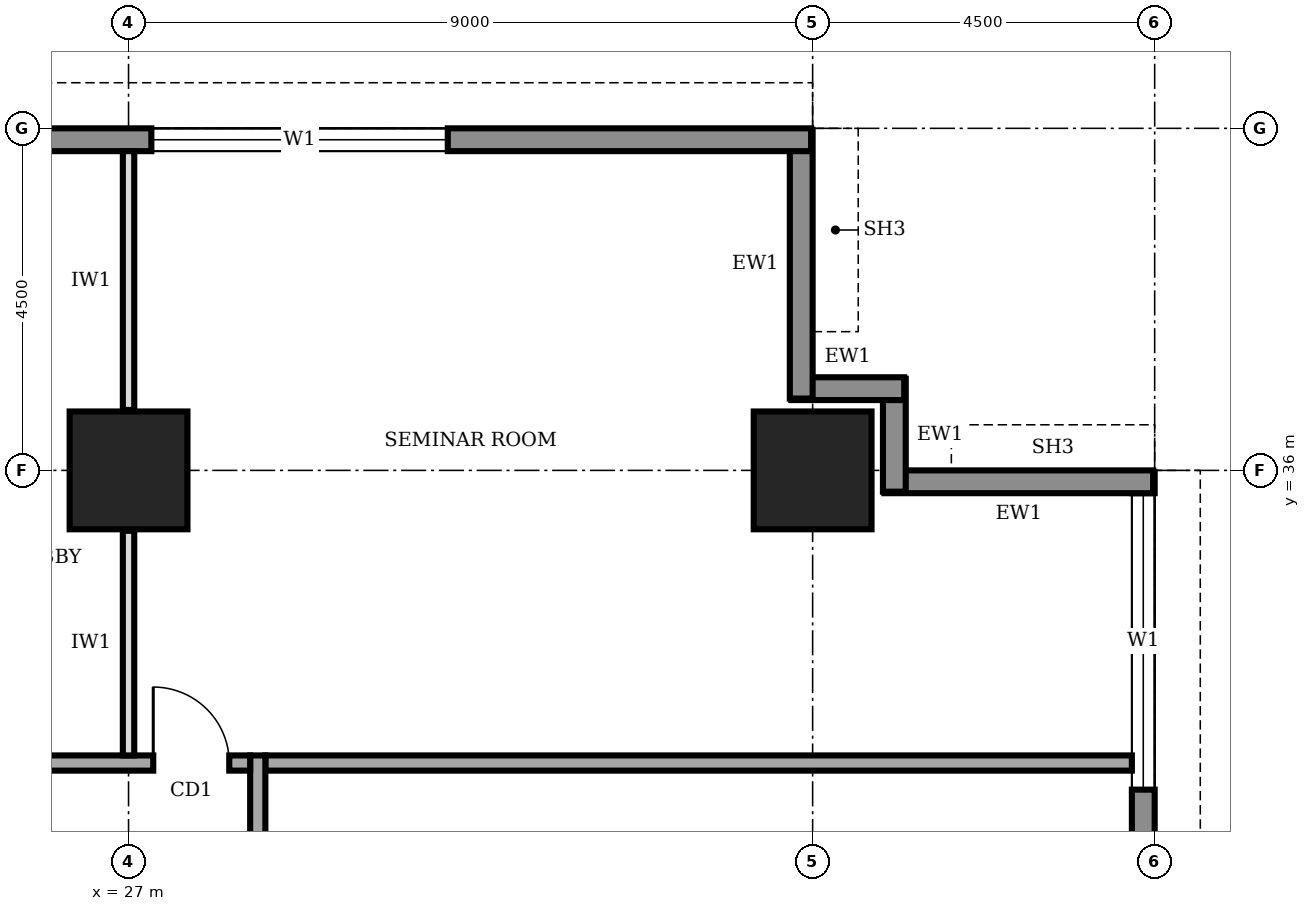
"""IFC4 building model, lengths in metres.
Left out: names, types, materials, properties, quantities, classifications, styles, units other than length and angle.
Written with IfcOpenShell. Run it as: python <this file> out.ifc"""

import sys

from ifc_helpers import new_model, si_unit, direction, frame, frame_2d, origin, origin_2d, place, context, subcontext, project, spatial, rectangle, extrude, element, fill, save


model = new_model("IFC4")
c1 = context("Model", 3, precision=1e-05, world=origin(), true_north=direction((0.0, 1.0)))
c2 = subcontext(c1, "Body", "Model", "MODEL_VIEW")
j1 = project(units=[si_unit("LENGTHUNIT", "METRE"), si_unit("PLANEANGLEUNIT", "RADIAN")], contexts=[c1])
p1 = place(None, origin())
s1 = spatial("IfcSite", under=j1, at=p1, CompositionType="ELEMENT")
p2 = place(p1, origin())
s2 = spatial("IfcBuilding", under=s1, at=p2, CompositionType="ELEMENT")
p3 = place(p2, frame((0.0, 0.0, 221.0)))
s3 = spatial("IfcBuildingStorey", under=s2, at=p3, CompositionType="ELEMENT", Elevation=221.0)
for number, where, z_axis, x_axis in (
    (1, (27.0, 36.0, 0.0), (0.0, 0.0, 1.0), (1.0, 0.0, 0.0)),
    (2, (36.0, 36.0, 0.0), (0.0, 0.0, 1.0), (1.0, 0.0, 0.0)),
):
    element("IfcColumn", number, at=place(p3, frame(where, z_axis=z_axis, x_axis=x_axis)), inside=s3, PredefinedType="COLUMN", context=c2, shape_type="SweptSolid", body=[
        extrude(rectangle(XDim=1.55, YDim=1.55, at=origin_2d()), origin(), (0.0, 0.0, 1.0), 4.0),
    ])
p4 = place(p3, frame((40.35, 4.52, 0.0), z_axis=(0.0, 0.0, 1.0), x_axis=(0.0, 1.0, 0.0)))
e3 = element("IfcWall", 3, at=p4, inside=s3, PredefinedType="STANDARD", context=c2, shape_type="SweptSolid", body=[
    extrude(rectangle(XDim=31.46, YDim=0.3, at=frame_2d((15.73, 0.0))), origin(), (0.0, 0.0, 1.0), 3.75),
])
p5 = place(p4, frame((4.78, 0.0, 0.9)))
e4 = element("IfcOpeningElement", 4, at=p5, cuts=e3, PredefinedType="OPENING", context=c2, shape_type="SweptSolid", body=[
    extrude(rectangle(XDim=3.9, YDim=2.2, at=frame_2d((1.95, 1.1))), frame((0.0, 0.16, 0.0), z_axis=(0.0, -1.0, 0.0), x_axis=(1.0, 0.0, 0.0)), (0.0, 0.0, 1.0), 0.32),
])
p6 = place(p4, frame((9.28, 0.0, 0.9)))
e5 = element("IfcOpeningElement", 5, at=p6, cuts=e3, PredefinedType="OPENING", context=c2, shape_type="SweptSolid", body=[
    extrude(rectangle(XDim=3.9, YDim=2.2, at=frame_2d((1.95, 1.1))), frame((0.0, 0.16, 0.0), z_axis=(0.0, -1.0, 0.0), x_axis=(1.0, 0.0, 0.0)), (0.0, 0.0, 1.0), 0.32),
])
p7 = place(p4, frame((13.78, 0.0, 0.9)))
e6 = element("IfcOpeningElement", 6, at=p7, cuts=e3, PredefinedType="OPENING", context=c2, shape_type="SweptSolid", body=[
    extrude(rectangle(XDim=3.9, YDim=2.2, at=frame_2d((1.95, 1.1))), frame((0.0, 0.16, 0.0), z_axis=(0.0, -1.0, 0.0), x_axis=(1.0, 0.0, 0.0)), (0.0, 0.0, 1.0), 0.32),
])
p8 = place(p4, frame((18.28, 0.0, 0.9)))
e7 = element("IfcOpeningElement", 7, at=p8, cuts=e3, PredefinedType="OPENING", context=c2, shape_type="SweptSolid", body=[
    extrude(rectangle(XDim=3.9, YDim=2.2, at=frame_2d((1.95, 1.1))), frame((0.0, 0.16, 0.0), z_axis=(0.0, -1.0, 0.0), x_axis=(1.0, 0.0, 0.0)), (0.0, 0.0, 1.0), 0.32),
])
p9 = place(p4, frame((22.78, 0.0, 0.9)))
e8 = element("IfcOpeningElement", 8, at=p9, cuts=e3, PredefinedType="OPENING", context=c2, shape_type="SweptSolid", body=[
    extrude(rectangle(XDim=3.9, YDim=2.2, at=frame_2d((1.95, 1.1))), frame((0.0, 0.16, 0.0), z_axis=(0.0, -1.0, 0.0), x_axis=(1.0, 0.0, 0.0)), (0.0, 0.0, 1.0), 0.32),
])
p10 = place(p4, frame((27.28, 0.0, 0.9)))
e9 = element("IfcOpeningElement", 9, at=p10, cuts=e3, PredefinedType="OPENING", context=c2, shape_type="SweptSolid", body=[
    extrude(rectangle(XDim=3.9, YDim=2.2, at=frame_2d((1.95, 1.1))), frame((0.0, 0.16, 0.0), z_axis=(0.0, -1.0, 0.0), x_axis=(1.0, 0.0, 0.0)), (0.0, 0.0, 1.0), 0.32),
])
p11 = place(p3, frame((40.48, 35.85, 0.0), z_axis=(0.0, 0.0, 1.0), x_axis=(-1.0, 0.0, 0.0)))
e10 = element("IfcWall", 10, at=p11, inside=s3, PredefinedType="STANDARD", context=c2, shape_type="SweptSolid", body=[
    extrude(rectangle(XDim=3.535, YDim=0.3, at=frame_2d((1.768, 0.0))), origin(), (0.0, 0.0, 1.0), 2.85),
])
for number, where, z_axis, x_axis in (
    (11, (37.075, 35.72, 0.0), (0.0, 0.0, 1.0), (0.0, 1.0, 0.0)),
    (12, (37.205, 37.075, 0.0), (0.0, 0.0, 1.0), (-1.0, 0.0, 0.0)),
):
    element("IfcWall", number, at=place(p3, frame(where, z_axis=z_axis, x_axis=x_axis)), inside=s3, PredefinedType="STANDARD", context=c2, shape_type="SweptSolid", body=[
        extrude(rectangle(XDim=1.485, YDim=0.3, at=frame_2d((0.743, 0.0))), origin(), (0.0, 0.0, 1.0), 3.75),
    ])
p12 = place(p3, frame((35.85, 36.945, 0.0), z_axis=(0.0, 0.0, 1.0), x_axis=(0.0, 1.0, 0.0)))
e13 = element("IfcWall", 13, at=p12, inside=s3, PredefinedType="STANDARD", context=c2, shape_type="SweptSolid", body=[
    extrude(rectangle(XDim=3.535, YDim=0.3, at=frame_2d((1.768, 0.0))), origin(), (0.0, 0.0, 1.0), 2.85),
])
p13 = place(p3, frame((35.98, 40.35, 0.0), z_axis=(0.0, 0.0, 1.0), x_axis=(-1.0, 0.0, 0.0)))
e14 = element("IfcWall", 14, at=p13, inside=s3, PredefinedType="STANDARD", context=c2, shape_type="SweptSolid", body=[
    extrude(rectangle(XDim=31.46, YDim=0.3, at=frame_2d((15.73, 0.0))), origin(), (0.0, 0.0, 1.0), 3.75),
])
p14 = place(p13, frame((27.28, 0.0, 0.9)))
e15 = element("IfcOpeningElement", 15, at=p14, cuts=e14, PredefinedType="OPENING", context=c2, shape_type="SweptSolid", body=[
    extrude(rectangle(XDim=3.9, YDim=2.2, at=frame_2d((1.95, 1.1))), frame((0.0, 0.16, 0.0), z_axis=(0.0, -1.0, 0.0), x_axis=(1.0, 0.0, 0.0)), (0.0, 0.0, 1.0), 0.32),
])
p15 = place(p13, frame((22.78, 0.0, 0.9)))
e16 = element("IfcOpeningElement", 16, at=p15, cuts=e14, PredefinedType="OPENING", context=c2, shape_type="SweptSolid", body=[
    extrude(rectangle(XDim=3.9, YDim=2.2, at=frame_2d((1.95, 1.1))), frame((0.0, 0.16, 0.0), z_axis=(0.0, -1.0, 0.0), x_axis=(1.0, 0.0, 0.0)), (0.0, 0.0, 1.0), 0.32),
])
p16 = place(p13, frame((4.78, 0.0, 0.9)))
e17 = element("IfcOpeningElement", 17, at=p16, cuts=e14, PredefinedType="OPENING", context=c2, shape_type="SweptSolid", body=[
    extrude(rectangle(XDim=3.9, YDim=2.2, at=frame_2d((1.95, 1.1))), frame((0.0, 0.16, 0.0), z_axis=(0.0, -1.0, 0.0), x_axis=(1.0, 0.0, 0.0)), (0.0, 0.0, 1.0), 0.32),
])
p17 = place(p3, frame((28.7, 8.45, 0.0), z_axis=(0.0, 0.0, 1.0), x_axis=(0.0, 1.0, 0.0)))
e18 = element("IfcWall", 18, at=p17, inside=s3, PredefinedType="SOLIDWALL", context=c2, shape_type="SweptSolid", body=[
    extrude(rectangle(XDim=23.8, YDim=0.2, at=frame_2d((11.9, 0.0))), origin(), (0.0, 0.0, 1.0), 3.75),
])
p18 = place(p17, frame((3.775, 0.0, 0.0)))
e19 = element("IfcOpeningElement", 19, at=p18, cuts=e18, PredefinedType="OPENING", context=c2, shape_type="SweptSolid", body=[
    extrude(rectangle(XDim=1.8, YDim=2.1, at=frame_2d((0.9, 1.05))), frame((0.0, 0.11, 0.0), z_axis=(0.0, -1.0, 0.0), x_axis=(1.0, 0.0, 0.0)), (0.0, 0.0, 1.0), 0.22),
])
p19 = place(p17, frame((11.3, 0.0, 0.0)))
e20 = element("IfcOpeningElement", 20, at=p19, cuts=e18, PredefinedType="OPENING", context=c2, shape_type="SweptSolid", body=[
    extrude(rectangle(XDim=1.0, YDim=2.1, at=frame_2d((0.5, 1.05))), frame((0.0, 0.11, 0.0), z_axis=(0.0, -1.0, 0.0), x_axis=(1.0, 0.0, 0.0)), (0.0, 0.0, 1.0), 0.22),
])
p20 = place(p17, frame((18.025, 0.0, 0.0)))
e21 = element("IfcOpeningElement", 21, at=p20, cuts=e18, PredefinedType="OPENING", context=c2, shape_type="SweptSolid", body=[
    extrude(rectangle(XDim=1.8, YDim=2.1, at=frame_2d((0.9, 1.05))), frame((0.0, 0.11, 0.0), z_axis=(0.0, -1.0, 0.0), x_axis=(1.0, 0.0, 0.0)), (0.0, 0.0, 1.0), 0.22),
])
p21 = place(p3, frame((28.6, 32.15, 0.0), z_axis=(0.0, 0.0, 1.0), x_axis=(-1.0, 0.0, 0.0)))
e22 = element("IfcWall", 22, at=p21, inside=s3, PredefinedType="SOLIDWALL", context=c2, shape_type="SweptSolid", body=[
    extrude(rectangle(XDim=16.9, YDim=0.2, at=frame_2d((8.45, 0.0))), origin(), (0.0, 0.0, 1.0), 3.75),
])
p22 = place(p21, frame((15.425, 0.0, 0.0)))
e23 = element("IfcOpeningElement", 23, at=p22, cuts=e22, PredefinedType="OPENING", context=c2, shape_type="SweptSolid", body=[
    extrude(rectangle(XDim=1.0, YDim=2.1, at=frame_2d((0.5, 1.05))), frame((0.0, 0.11, 0.0), z_axis=(0.0, -1.0, 0.0), x_axis=(1.0, 0.0, 0.0)), (0.0, 0.0, 1.0), 0.22),
])
p23 = place(p21, frame((12.35, 0.0, 0.0)))
e24 = element("IfcOpeningElement", 24, at=p23, cuts=e22, PredefinedType="OPENING", context=c2, shape_type="SweptSolid", body=[
    extrude(rectangle(XDim=1.0, YDim=2.1, at=frame_2d((0.5, 1.05))), frame((0.0, 0.11, 0.0), z_axis=(0.0, -1.0, 0.0), x_axis=(1.0, 0.0, 0.0)), (0.0, 0.0, 1.0), 0.22),
])
p24 = place(p21, frame((5.6, 0.0, 0.0)))
e25 = element("IfcOpeningElement", 25, at=p24, cuts=e22, PredefinedType="OPENING", context=c2, shape_type="SweptSolid", body=[
    extrude(rectangle(XDim=1.0, YDim=2.1, at=frame_2d((0.5, 1.05))), frame((0.0, 0.11, 0.0), z_axis=(0.0, -1.0, 0.0), x_axis=(1.0, 0.0, 0.0)), (0.0, 0.0, 1.0), 0.22),
])
p25 = place(p21, frame((0.275, 0.0, 0.0)))
e26 = element("IfcOpeningElement", 26, at=p25, cuts=e22, PredefinedType="OPENING", context=c2, shape_type="SweptSolid", body=[
    extrude(rectangle(XDim=1.0, YDim=2.1, at=frame_2d((0.5, 1.05))), frame((0.0, 0.11, 0.0), z_axis=(0.0, -1.0, 0.0), x_axis=(1.0, 0.0, 0.0)), (0.0, 0.0, 1.0), 0.22),
])
p26 = place(p3, frame((28.8, 32.15, 0.0), z_axis=(0.0, 0.0, 1.0), x_axis=(1.0, 0.0, 0.0)))
e27 = element("IfcWall", 27, at=p26, inside=s3, PredefinedType="SOLIDWALL", context=c2, shape_type="SweptSolid", body=[
    extrude(rectangle(XDim=11.4, YDim=0.2, at=frame_2d((5.7, 0.0))), origin(), (0.0, 0.0, 1.0), 3.75),
])
p27 = place(p3, frame((27.0, 32.25, 0.0), z_axis=(0.0, 0.0, 1.0), x_axis=(0.0, 1.0, 0.0)))
e28 = element("IfcWall", 28, at=p27, inside=s3, PredefinedType="PARTITIONING", context=c2, shape_type="SweptSolid", body=[
    extrude(rectangle(XDim=2.955, YDim=0.15, at=frame_2d((1.478, 0.0))), origin(), (0.0, 0.0, 1.0), 2.85),
])
p28 = place(p3, frame((27.0, 36.795, 0.0), z_axis=(0.0, 0.0, 1.0), x_axis=(0.0, 1.0, 0.0)))
e29 = element("IfcWall", 29, at=p28, inside=s3, PredefinedType="PARTITIONING", context=c2, shape_type="SweptSolid", body=[
    extrude(rectangle(XDim=3.405, YDim=0.15, at=frame_2d((1.703, 0.0))), origin(), (0.0, 0.0, 1.0), 2.85),
])
p29 = place(p10, origin())
e30 = element("IfcWindow", 30, at=p29, inside=s3, PartitioningType="SINGLE_PANEL", PredefinedType="WINDOW", context=c2, shape_type="SweptSolid", body=[
    extrude(rectangle(XDim=3.9, YDim=2.2, at=frame_2d((1.95, 1.1))), frame((0.0, 0.03, 0.0), z_axis=(0.0, -1.0, 0.0), x_axis=(1.0, 0.0, 0.0)), (0.0, 0.0, 1.0), 0.06),
])
fill(e9, e30)
p30 = place(p16, origin())
e31 = element("IfcWindow", 31, at=p30, inside=s3, PartitioningType="SINGLE_PANEL", PredefinedType="WINDOW", context=c2, shape_type="SweptSolid", body=[
    extrude(rectangle(XDim=3.9, YDim=2.2, at=frame_2d((1.95, 1.1))), frame((0.0, 0.03, 0.0), z_axis=(0.0, -1.0, 0.0), x_axis=(1.0, 0.0, 0.0)), (0.0, 0.0, 1.0), 0.06),
])
fill(e17, e31)
p31 = place(p25, frame((1.0, 0.0, 0.0), z_axis=(0.0, 0.0, 1.0), x_axis=(-1.0, 0.0, 0.0)))
e32 = element("IfcDoor", 32, at=p31, inside=s3, OperationType="SINGLE_SWING_LEFT", PredefinedType="DOOR", context=c2, shape_type="SweptSolid", body=[
    extrude(rectangle(XDim=1.0, YDim=2.1, at=frame_2d((0.5, 1.05))), frame((0.0, 0.025, 0.0), z_axis=(0.0, -1.0, 0.0), x_axis=(1.0, 0.0, 0.0)), (0.0, 0.0, 1.0), 0.05),
])
fill(e26, e32)
save(model, sys.argv[1])
